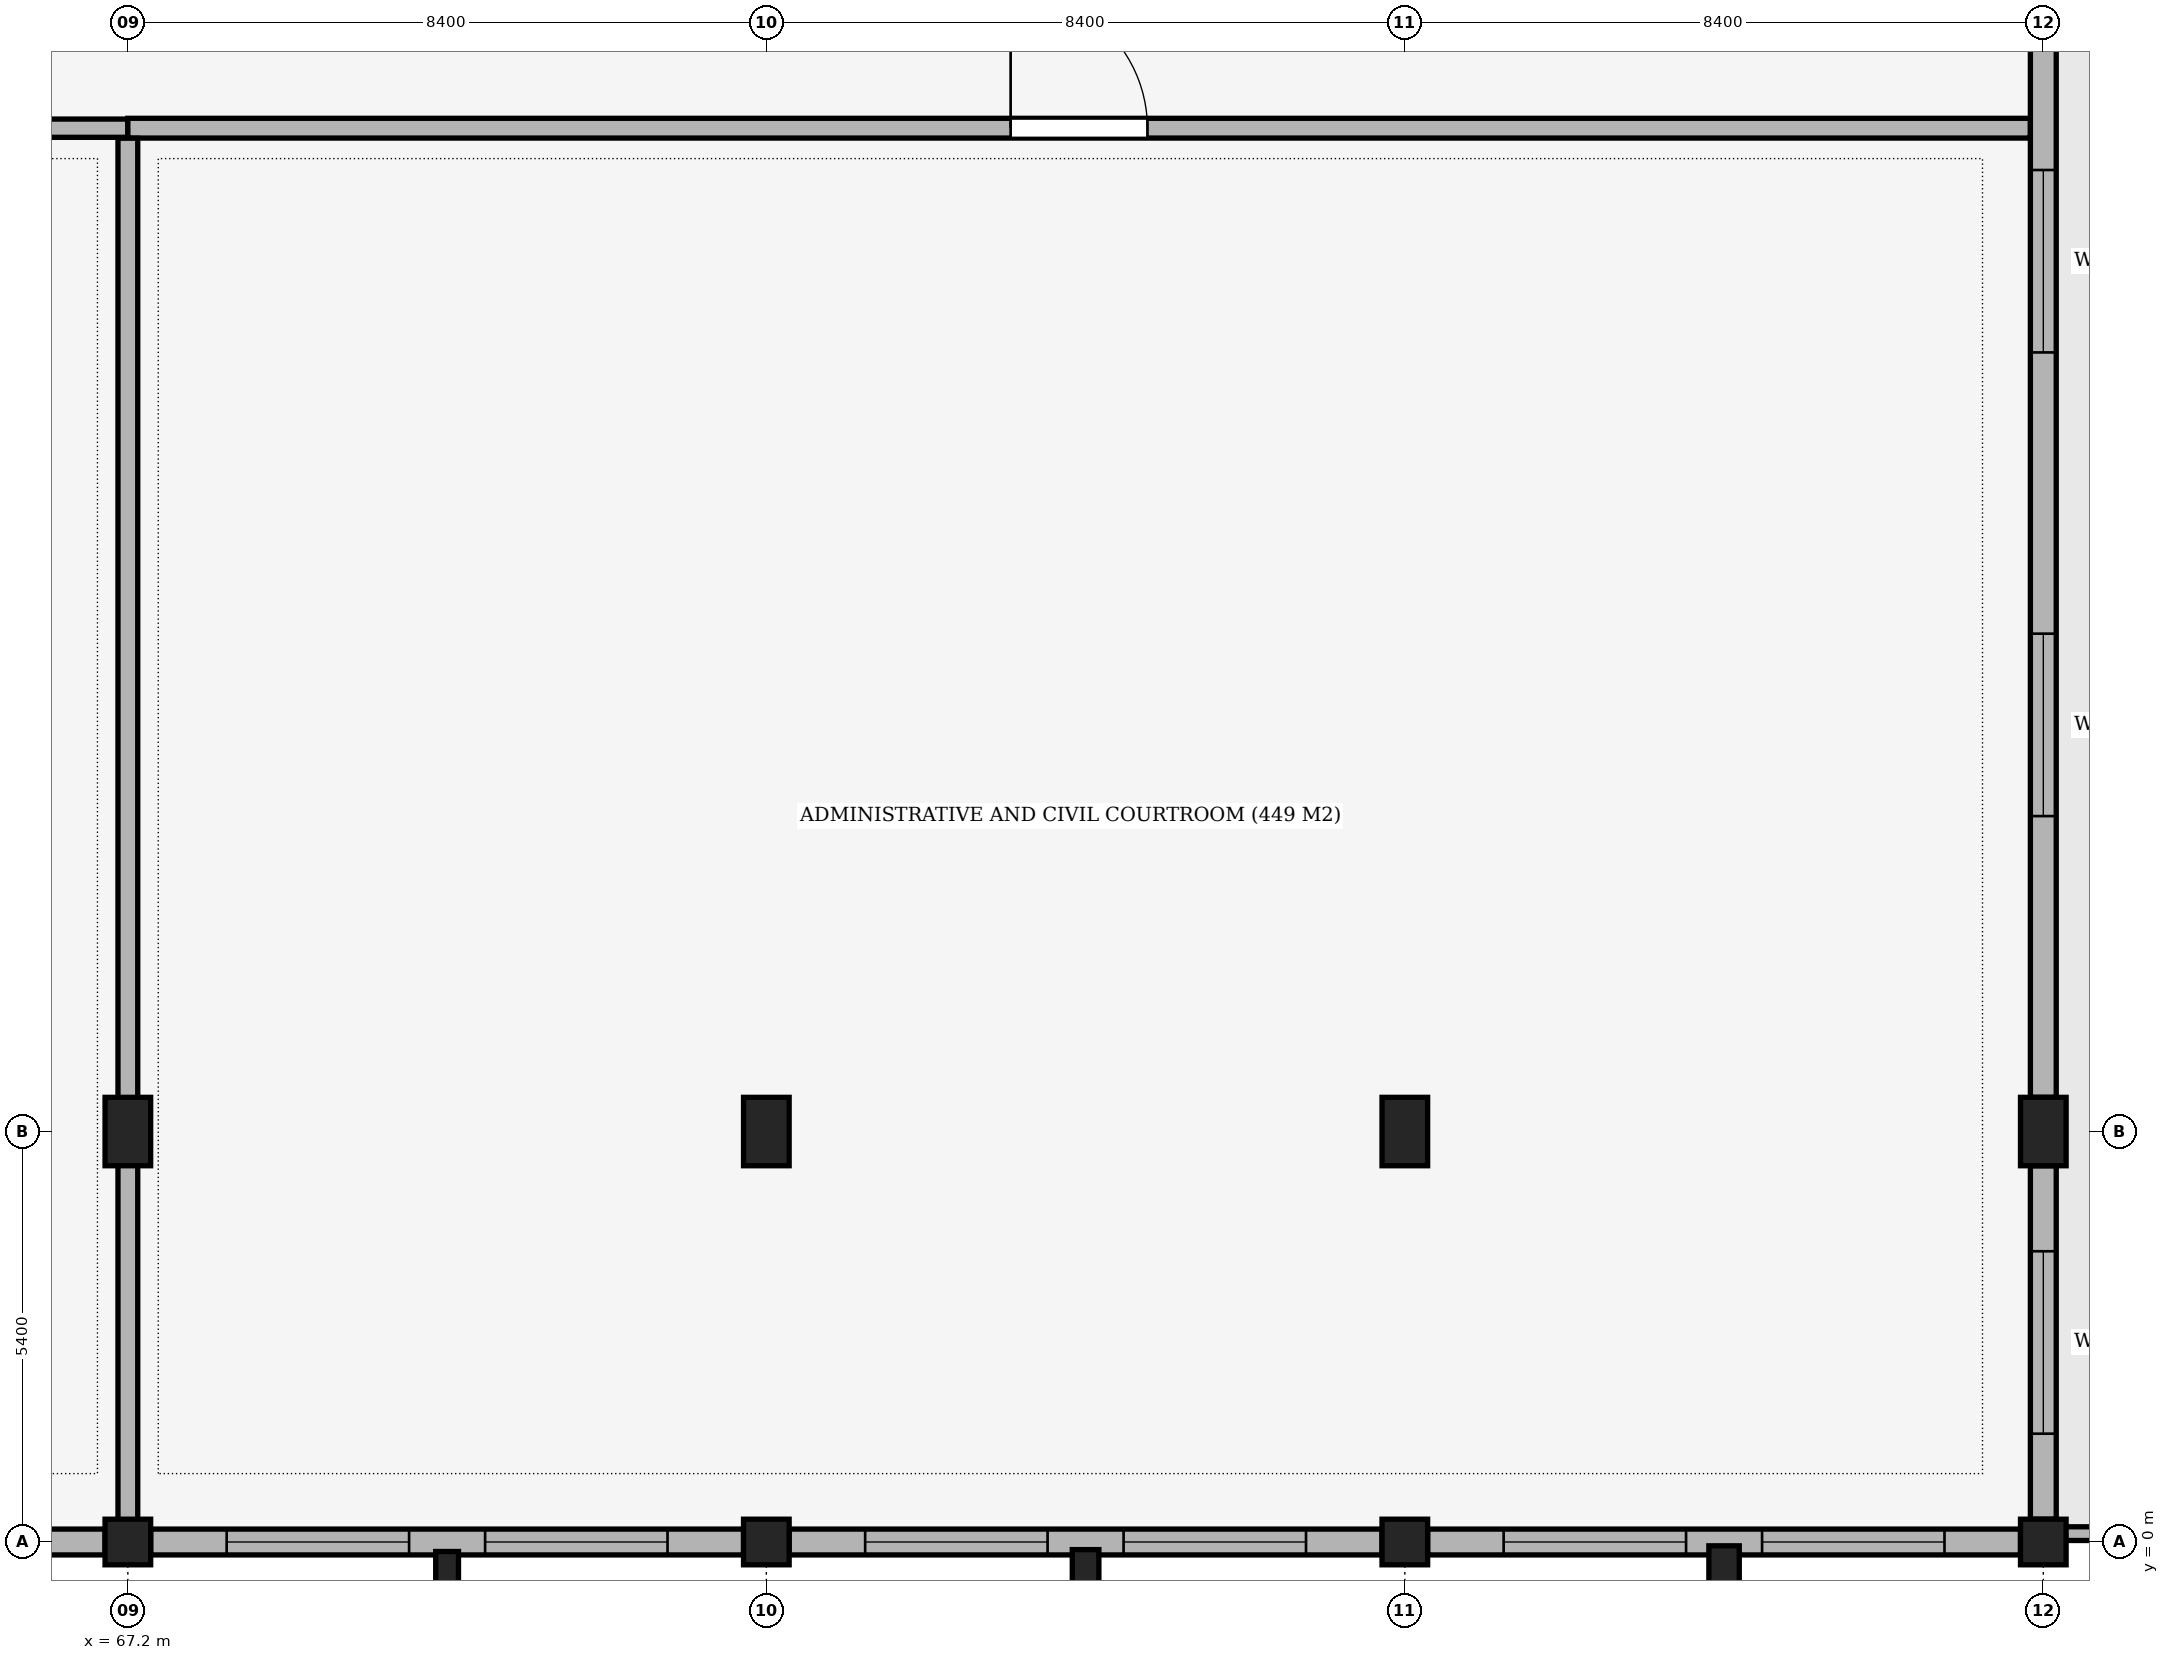
"""IFC4 building model, lengths in metres.
Left out: names, types, materials, properties, quantities, classifications, styles, units other than length and angle.
Written with IfcOpenShell. Run it as: python <this file> out.ifc"""

import sys

from ifc_helpers import new_model, si_unit, direction, frame, frame_2d, origin, origin_2d, place, context, subcontext, project, spatial, rectangle, extrude, element, fill, save


model = new_model("IFC4")
c1 = context("Model", 3, precision=1e-05, world=origin(), true_north=direction((0.0, 1.0)))
c2 = subcontext(c1, "Body", "Model", "MODEL_VIEW")
j1 = project(units=[si_unit("LENGTHUNIT", "METRE"), si_unit("PLANEANGLEUNIT", "RADIAN")], contexts=[c1])
p1 = place(None, origin())
s1 = spatial("IfcSite", under=j1, at=p1, CompositionType="ELEMENT")
p2 = place(p1, origin())
s2 = spatial("IfcBuilding", under=s1, at=p2, CompositionType="ELEMENT")
p3 = place(p2, frame((0.0, 0.0, 15.3)))
s3 = spatial("IfcBuildingStorey", under=s2, at=p3, CompositionType="ELEMENT", Elevation=15.3)
p4 = place(p3, frame((67.2, 0.0, 0.0), z_axis=(0.0, 0.0, 1.0), x_axis=(1.0, 0.0, 0.0)))
e1 = element("IfcColumn", 1, at=p4, inside=s3, PredefinedType="COLUMN", context=c2, shape_type="SweptSolid", body=[
    extrude(rectangle(XDim=0.6, YDim=0.6, at=origin_2d()), origin(), (0.0, 0.0, 1.0), 5.1),
])
p5 = place(p3, frame((67.2, 5.4, 0.0), z_axis=(0.0, 0.0, 1.0), x_axis=(1.0, 0.0, 0.0)))
e2 = element("IfcColumn", 2, at=p5, inside=s3, PredefinedType="COLUMN", context=c2, shape_type="SweptSolid", body=[
    extrude(rectangle(XDim=0.6, YDim=0.9, at=origin_2d()), origin(), (0.0, 0.0, 1.0), 5.1),
])
p6 = place(p3, frame((75.6, 0.0, 0.0), z_axis=(0.0, 0.0, 1.0), x_axis=(1.0, 0.0, 0.0)))
e3 = element("IfcColumn", 3, at=p6, inside=s3, PredefinedType="COLUMN", context=c2, shape_type="SweptSolid", body=[
    extrude(rectangle(XDim=0.6, YDim=0.6, at=origin_2d()), origin(), (0.0, 0.0, 1.0), 5.1),
])
p7 = place(p3, frame((75.6, 5.4, 0.0), z_axis=(0.0, 0.0, 1.0), x_axis=(1.0, 0.0, 0.0)))
e4 = element("IfcColumn", 4, at=p7, inside=s3, PredefinedType="COLUMN", context=c2, shape_type="SweptSolid", body=[
    extrude(rectangle(XDim=0.6, YDim=0.9, at=origin_2d()), origin(), (0.0, 0.0, 1.0), 5.1),
])
p8 = place(p3, frame((84.0, 0.0, 0.0), z_axis=(0.0, 0.0, 1.0), x_axis=(1.0, 0.0, 0.0)))
e5 = element("IfcColumn", 5, at=p8, inside=s3, PredefinedType="COLUMN", context=c2, shape_type="SweptSolid", body=[
    extrude(rectangle(XDim=0.6, YDim=0.6, at=origin_2d()), origin(), (0.0, 0.0, 1.0), 5.1),
])
p9 = place(p3, frame((84.0, 5.4, 0.0), z_axis=(0.0, 0.0, 1.0), x_axis=(1.0, 0.0, 0.0)))
e6 = element("IfcColumn", 6, at=p9, inside=s3, PredefinedType="COLUMN", context=c2, shape_type="SweptSolid", body=[
    extrude(rectangle(XDim=0.6, YDim=0.9, at=origin_2d()), origin(), (0.0, 0.0, 1.0), 5.1),
])
p10 = place(p3, frame((92.4, 0.0, 0.0), z_axis=(0.0, 0.0, 1.0), x_axis=(1.0, 0.0, 0.0)))
e7 = element("IfcColumn", 7, at=p10, inside=s3, PredefinedType="COLUMN", context=c2, shape_type="SweptSolid", body=[
    extrude(rectangle(XDim=0.6, YDim=0.6, at=origin_2d()), origin(), (0.0, 0.0, 1.0), 5.1),
])
p11 = place(p3, frame((92.4, 5.4, 0.0), z_axis=(0.0, 0.0, 1.0), x_axis=(1.0, 0.0, 0.0)))
e8 = element("IfcColumn", 8, at=p11, inside=s3, PredefinedType="COLUMN", context=c2, shape_type="SweptSolid", body=[
    extrude(rectangle(XDim=0.6, YDim=0.9, at=origin_2d()), origin(), (0.0, 0.0, 1.0), 5.1),
])
p12 = place(p3, frame((71.4, -0.35, 0.0), z_axis=(0.0, 0.0, 1.0), x_axis=(1.0, 0.0, 0.0)))
e9 = element("IfcColumn", 9, at=p12, inside=s3, PredefinedType="PILASTER", context=c2, shape_type="SweptSolid", body=[
    extrude(rectangle(XDim=0.3, YDim=0.45, at=origin_2d()), origin(), (0.0, 0.0, 1.0), 5.1),
])
p13 = place(p3, frame((79.8, -0.35, 0.0), z_axis=(0.0, 0.0, 1.0), x_axis=(1.0, 0.0, 0.0)))
e10 = element("IfcColumn", 10, at=p13, inside=s3, PredefinedType="PILASTER", context=c2, shape_type="SweptSolid", body=[
    extrude(rectangle(XDim=0.35, YDim=0.5, at=origin_2d()), origin(), (0.0, 0.0, 1.0), 5.1),
])
p14 = place(p3, frame((88.2, -0.35, 0.0), z_axis=(0.0, 0.0, 1.0), x_axis=(1.0, 0.0, 0.0)))
e11 = element("IfcColumn", 11, at=p14, inside=s3, PredefinedType="PILASTER", context=c2, shape_type="SweptSolid", body=[
    extrude(rectangle(XDim=0.4, YDim=0.6, at=origin_2d()), origin(), (0.0, 0.0, 1.0), 5.1),
])
p15 = place(p3, frame((92.4, 21.75, 0.0), z_axis=(0.0, 0.0, 1.0), x_axis=(0.0, -1.0, 0.0)))
e12 = element("IfcWall", 12, at=p15, inside=s3, PredefinedType="SOLIDWALL", context=c2, shape_type="SweptSolid", body=[
    extrude(rectangle(XDim=15.9, YDim=0.34, at=frame_2d((7.95, 0.0))), origin(), (0.0, 0.0, 1.0), 3.79),
])
p16 = place(p15, frame((3.7, 0.0, 0.85)))
e13 = element("IfcOpeningElement", 13, at=p16, cuts=e12, PredefinedType="OPENING", context=c2, shape_type="SweptSolid", body=[
    extrude(rectangle(XDim=2.4, YDim=2.4, at=frame_2d((1.2, 1.2))), frame((0.0, 0.185, 0.0), z_axis=(0.0, -1.0, 0.0), x_axis=(1.0, 0.0, 0.0)), (0.0, 0.0, 1.0), 0.37),
])
p17 = place(p15, frame((9.8, 0.0, 0.85)))
e14 = element("IfcOpeningElement", 14, at=p17, cuts=e12, PredefinedType="OPENING", context=c2, shape_type="SweptSolid", body=[
    extrude(rectangle(XDim=2.4, YDim=2.4, at=frame_2d((1.2, 1.2))), frame((0.0, 0.185, 0.0), z_axis=(0.0, -1.0, 0.0), x_axis=(1.0, 0.0, 0.0)), (0.0, 0.0, 1.0), 0.37),
])
p18 = place(p3, frame((92.4, 4.95, 0.0), z_axis=(0.0, 0.0, 1.0), x_axis=(0.0, -1.0, 0.0)))
e15 = element("IfcWall", 15, at=p18, inside=s3, PredefinedType="SOLIDWALL", context=c2, shape_type="SweptSolid", body=[
    extrude(rectangle(XDim=4.65, YDim=0.34, at=frame_2d((2.325, 0.0))), origin(), (0.0, 0.0, 1.0), 4.29),
])
p19 = place(p18, frame((1.125, 0.0, 0.85)))
e16 = element("IfcOpeningElement", 16, at=p19, cuts=e15, PredefinedType="OPENING", context=c2, shape_type="SweptSolid", body=[
    extrude(rectangle(XDim=2.4, YDim=2.4, at=frame_2d((1.2, 1.2))), frame((0.0, 0.185, 0.0), z_axis=(0.0, -1.0, 0.0), x_axis=(1.0, 0.0, 0.0)), (0.0, 0.0, 1.0), 0.37),
])
p20 = place(p3, frame((92.1, 0.0, 0.0), z_axis=(0.0, 0.0, 1.0), x_axis=(-1.0, 0.0, 0.0)))
e17 = element("IfcWall", 17, at=p20, inside=s3, PredefinedType="SOLIDWALL", context=c2, shape_type="SweptSolid", body=[
    extrude(rectangle(XDim=7.8, YDim=0.34, at=frame_2d((3.9, 0.0))), origin(), (0.0, 0.0, 1.0), 4.14),
])
p21 = place(p20, frame((1.0, 0.0, 0.85)))
e18 = element("IfcOpeningElement", 18, at=p21, cuts=e17, PredefinedType="OPENING", context=c2, shape_type="SweptSolid", body=[
    extrude(rectangle(XDim=2.4, YDim=2.4, at=frame_2d((1.2, 1.2))), frame((0.0, 0.185, 0.0), z_axis=(0.0, -1.0, 0.0), x_axis=(1.0, 0.0, 0.0)), (0.0, 0.0, 1.0), 0.37),
])
p22 = place(p20, frame((4.4, 0.0, 0.85)))
e19 = element("IfcOpeningElement", 19, at=p22, cuts=e17, PredefinedType="OPENING", context=c2, shape_type="SweptSolid", body=[
    extrude(rectangle(XDim=2.4, YDim=2.4, at=frame_2d((1.2, 1.2))), frame((0.0, 0.185, 0.0), z_axis=(0.0, -1.0, 0.0), x_axis=(1.0, 0.0, 0.0)), (0.0, 0.0, 1.0), 0.37),
])
p23 = place(p3, frame((83.7, 0.0, 0.0), z_axis=(0.0, 0.0, 1.0), x_axis=(-1.0, 0.0, 0.0)))
e20 = element("IfcWall", 20, at=p23, inside=s3, PredefinedType="SOLIDWALL", context=c2, shape_type="SweptSolid", body=[
    extrude(rectangle(XDim=7.8, YDim=0.34, at=frame_2d((3.9, 0.0))), origin(), (0.0, 0.0, 1.0), 4.14),
])
p24 = place(p23, frame((1.0, 0.0, 0.85)))
e21 = element("IfcOpeningElement", 21, at=p24, cuts=e20, PredefinedType="OPENING", context=c2, shape_type="SweptSolid", body=[
    extrude(rectangle(XDim=2.4, YDim=2.4, at=frame_2d((1.2, 1.2))), frame((0.0, 0.185, 0.0), z_axis=(0.0, -1.0, 0.0), x_axis=(1.0, 0.0, 0.0)), (0.0, 0.0, 1.0), 0.37),
])
p25 = place(p23, frame((4.4, 0.0, 0.85)))
e22 = element("IfcOpeningElement", 22, at=p25, cuts=e20, PredefinedType="OPENING", context=c2, shape_type="SweptSolid", body=[
    extrude(rectangle(XDim=2.4, YDim=2.4, at=frame_2d((1.2, 1.2))), frame((0.0, 0.185, 0.0), z_axis=(0.0, -1.0, 0.0), x_axis=(1.0, 0.0, 0.0)), (0.0, 0.0, 1.0), 0.37),
])
p26 = place(p3, frame((75.3, 0.0, 0.0), z_axis=(0.0, 0.0, 1.0), x_axis=(-1.0, 0.0, 0.0)))
e23 = element("IfcWall", 23, at=p26, inside=s3, PredefinedType="SOLIDWALL", context=c2, shape_type="SweptSolid", body=[
    extrude(rectangle(XDim=7.8, YDim=0.34, at=frame_2d((3.9, 0.0))), origin(), (0.0, 0.0, 1.0), 4.14),
])
p27 = place(p26, frame((1.0, 0.0, 0.85)))
e24 = element("IfcOpeningElement", 24, at=p27, cuts=e23, PredefinedType="OPENING", context=c2, shape_type="SweptSolid", body=[
    extrude(rectangle(XDim=2.4, YDim=2.4, at=frame_2d((1.2, 1.2))), frame((0.0, 0.185, 0.0), z_axis=(0.0, -1.0, 0.0), x_axis=(1.0, 0.0, 0.0)), (0.0, 0.0, 1.0), 0.37),
])
p28 = place(p26, frame((4.4, 0.0, 0.85)))
e25 = element("IfcOpeningElement", 25, at=p28, cuts=e23, PredefinedType="OPENING", context=c2, shape_type="SweptSolid", body=[
    extrude(rectangle(XDim=2.4, YDim=2.4, at=frame_2d((1.2, 1.2))), frame((0.0, 0.185, 0.0), z_axis=(0.0, -1.0, 0.0), x_axis=(1.0, 0.0, 0.0)), (0.0, 0.0, 1.0), 0.37),
])
p29 = place(p3, frame((66.9, 0.0, 0.0), z_axis=(0.0, 0.0, 1.0), x_axis=(-1.0, 0.0, 0.0)))
e26 = element("IfcWall", 26, at=p29, inside=s3, PredefinedType="SOLIDWALL", context=c2, shape_type="SweptSolid", body=[
    extrude(rectangle(XDim=7.8, YDim=0.34, at=frame_2d((3.9, 0.0))), origin(), (0.0, 0.0, 1.0), 4.14),
])
p30 = place(p29, frame((1.0, 0.0, 0.85)))
e27 = element("IfcOpeningElement", 27, at=p30, cuts=e26, PredefinedType="OPENING", context=c2, shape_type="SweptSolid", body=[
    extrude(rectangle(XDim=2.4, YDim=2.4, at=frame_2d((1.2, 1.2))), frame((0.0, 0.185, 0.0), z_axis=(0.0, -1.0, 0.0), x_axis=(1.0, 0.0, 0.0)), (0.0, 0.0, 1.0), 0.37),
])
p31 = place(p29, frame((4.4, 0.0, 0.85)))
e28 = element("IfcOpeningElement", 28, at=p31, cuts=e26, PredefinedType="OPENING", context=c2, shape_type="SweptSolid", body=[
    extrude(rectangle(XDim=2.4, YDim=2.4, at=frame_2d((1.2, 1.2))), frame((0.0, 0.185, 0.0), z_axis=(0.0, -1.0, 0.0), x_axis=(1.0, 0.0, 0.0)), (0.0, 0.0, 1.0), 0.37),
])
p32 = place(p3, frame((92.65, 0.11, 0.0), z_axis=(0.0, 0.0, 1.0), x_axis=(1.0, 0.0, 0.0)))
e29 = element("IfcWall", 29, at=p32, inside=s3, PredefinedType="PARAPET", context=c2, shape_type="SweptSolid", body=[
    extrude(rectangle(XDim=16.3, YDim=0.18, at=frame_2d((8.15, 0.0))), origin(), (0.0, 0.0, 1.0), 1.15),
])
p33 = place(p3, frame((50.4, 18.6, 0.0), z_axis=(0.0, 0.0, 1.0), x_axis=(1.0, 0.0, 0.0)))
e30 = element("IfcWall", 30, at=p33, inside=s3, PredefinedType="PARTITIONING", context=c2, shape_type="SweptSolid", body=[
    extrude(rectangle(XDim=16.8, YDim=0.24, at=frame_2d((8.4, 0.0))), origin(), (0.0, 0.0, 1.0), 3.79),
])
p34 = place(p33, frame((7.5, 0.0, 0.0)))
e31 = element("IfcOpeningElement", 31, at=p34, cuts=e30, PredefinedType="OPENING", context=c2, shape_type="SweptSolid", body=[
    extrude(rectangle(XDim=1.8, YDim=2.4, at=frame_2d((0.9, 1.2))), frame((0.0, 0.135, 0.0), z_axis=(0.0, -1.0, 0.0), x_axis=(1.0, 0.0, 0.0)), (0.0, 0.0, 1.0), 0.27),
])
p35 = place(p3, frame((67.2, 18.6, 0.0), z_axis=(0.0, 0.0, 1.0), x_axis=(1.0, 0.0, 0.0)))
e32 = element("IfcWall", 32, at=p35, inside=s3, PredefinedType="PARTITIONING", context=c2, shape_type="SweptSolid", body=[
    extrude(rectangle(XDim=25.028, YDim=0.26, at=frame_2d((12.514, 0.0))), origin(), (0.0, 0.0, 1.0), 3.79),
])
p36 = place(p35, frame((11.614, 0.0, 0.0)))
e33 = element("IfcOpeningElement", 33, at=p36, cuts=e32, PredefinedType="OPENING", context=c2, shape_type="SweptSolid", body=[
    extrude(rectangle(XDim=1.8, YDim=2.4, at=frame_2d((0.9, 1.2))), frame((0.0, 0.145, 0.0), z_axis=(0.0, -1.0, 0.0), x_axis=(1.0, 0.0, 0.0)), (0.0, 0.0, 1.0), 0.29),
])
p37 = place(p3, frame((67.2, -0.064, 0.0), z_axis=(0.0, 0.0, 1.0), x_axis=(0.0, 1.0, 0.0)))
e34 = element("IfcWall", 34, at=p37, inside=s3, PredefinedType="PARTITIONING", context=c2, shape_type="SweptSolid", body=[
    extrude(rectangle(XDim=18.532, YDim=0.26, at=frame_2d((9.266, 0.0))), origin(), (0.0, 0.0, 1.0), 3.79),
])
p38 = place(p16, origin())
e35 = element("IfcWindow", 35, at=p38, inside=s3, PartitioningType="SINGLE_PANEL", PredefinedType="WINDOW", context=c2, shape_type="SweptSolid", body=[
    extrude(rectangle(XDim=2.4, YDim=2.4, at=frame_2d((1.2, 1.2))), frame((0.0, 0.03, 0.0), z_axis=(0.0, -1.0, 0.0), x_axis=(1.0, 0.0, 0.0)), (0.0, 0.0, 1.0), 0.06),
])
fill(e13, e35)
p39 = place(p17, origin())
e36 = element("IfcWindow", 36, at=p39, inside=s3, PartitioningType="SINGLE_PANEL", PredefinedType="WINDOW", context=c2, shape_type="SweptSolid", body=[
    extrude(rectangle(XDim=2.4, YDim=2.4, at=frame_2d((1.2, 1.2))), frame((0.0, 0.03, 0.0), z_axis=(0.0, -1.0, 0.0), x_axis=(1.0, 0.0, 0.0)), (0.0, 0.0, 1.0), 0.06),
])
fill(e14, e36)
p40 = place(p19, origin())
e37 = element("IfcWindow", 37, at=p40, inside=s3, PartitioningType="SINGLE_PANEL", PredefinedType="WINDOW", context=c2, shape_type="SweptSolid", body=[
    extrude(rectangle(XDim=2.4, YDim=2.4, at=frame_2d((1.2, 1.2))), frame((0.0, 0.03, 0.0), z_axis=(0.0, -1.0, 0.0), x_axis=(1.0, 0.0, 0.0)), (0.0, 0.0, 1.0), 0.06),
])
fill(e16, e37)
p41 = place(p21, origin())
e38 = element("IfcWindow", 38, at=p41, inside=s3, PartitioningType="SINGLE_PANEL", PredefinedType="WINDOW", context=c2, shape_type="SweptSolid", body=[
    extrude(rectangle(XDim=2.4, YDim=2.4, at=frame_2d((1.2, 1.2))), frame((0.0, 0.03, 0.0), z_axis=(0.0, -1.0, 0.0), x_axis=(1.0, 0.0, 0.0)), (0.0, 0.0, 1.0), 0.06),
])
fill(e18, e38)
p42 = place(p22, origin())
e39 = element("IfcWindow", 39, at=p42, inside=s3, PartitioningType="SINGLE_PANEL", PredefinedType="WINDOW", context=c2, shape_type="SweptSolid", body=[
    extrude(rectangle(XDim=2.4, YDim=2.4, at=frame_2d((1.2, 1.2))), frame((0.0, 0.03, 0.0), z_axis=(0.0, -1.0, 0.0), x_axis=(1.0, 0.0, 0.0)), (0.0, 0.0, 1.0), 0.06),
])
fill(e19, e39)
p43 = place(p24, origin())
e40 = element("IfcWindow", 40, at=p43, inside=s3, PartitioningType="SINGLE_PANEL", PredefinedType="WINDOW", context=c2, shape_type="SweptSolid", body=[
    extrude(rectangle(XDim=2.4, YDim=2.4, at=frame_2d((1.2, 1.2))), frame((0.0, 0.03, 0.0), z_axis=(0.0, -1.0, 0.0), x_axis=(1.0, 0.0, 0.0)), (0.0, 0.0, 1.0), 0.06),
])
fill(e21, e40)
p44 = place(p25, origin())
e41 = element("IfcWindow", 41, at=p44, inside=s3, PartitioningType="SINGLE_PANEL", PredefinedType="WINDOW", context=c2, shape_type="SweptSolid", body=[
    extrude(rectangle(XDim=2.4, YDim=2.4, at=frame_2d((1.2, 1.2))), frame((0.0, 0.03, 0.0), z_axis=(0.0, -1.0, 0.0), x_axis=(1.0, 0.0, 0.0)), (0.0, 0.0, 1.0), 0.06),
])
fill(e22, e41)
p45 = place(p27, origin())
e42 = element("IfcWindow", 42, at=p45, inside=s3, PartitioningType="SINGLE_PANEL", PredefinedType="WINDOW", context=c2, shape_type="SweptSolid", body=[
    extrude(rectangle(XDim=2.4, YDim=2.4, at=frame_2d((1.2, 1.2))), frame((0.0, 0.03, 0.0), z_axis=(0.0, -1.0, 0.0), x_axis=(1.0, 0.0, 0.0)), (0.0, 0.0, 1.0), 0.06),
])
fill(e24, e42)
p46 = place(p28, origin())
e43 = element("IfcWindow", 43, at=p46, inside=s3, PartitioningType="SINGLE_PANEL", PredefinedType="WINDOW", context=c2, shape_type="SweptSolid", body=[
    extrude(rectangle(XDim=2.4, YDim=2.4, at=frame_2d((1.2, 1.2))), frame((0.0, 0.03, 0.0), z_axis=(0.0, -1.0, 0.0), x_axis=(1.0, 0.0, 0.0)), (0.0, 0.0, 1.0), 0.06),
])
fill(e25, e43)
p47 = place(p36, origin())
e44 = element("IfcDoor", 44, at=p47, inside=s3, OperationType="SINGLE_SWING_LEFT", PredefinedType="DOOR", context=c2, shape_type="SweptSolid", body=[
    extrude(rectangle(XDim=1.8, YDim=2.4, at=frame_2d((0.9, 1.2))), frame((0.0, 0.025, 0.0), z_axis=(0.0, -1.0, 0.0), x_axis=(1.0, 0.0, 0.0)), (0.0, 0.0, 1.0), 0.05),
])
fill(e33, e44)
save(model, sys.argv[1])
